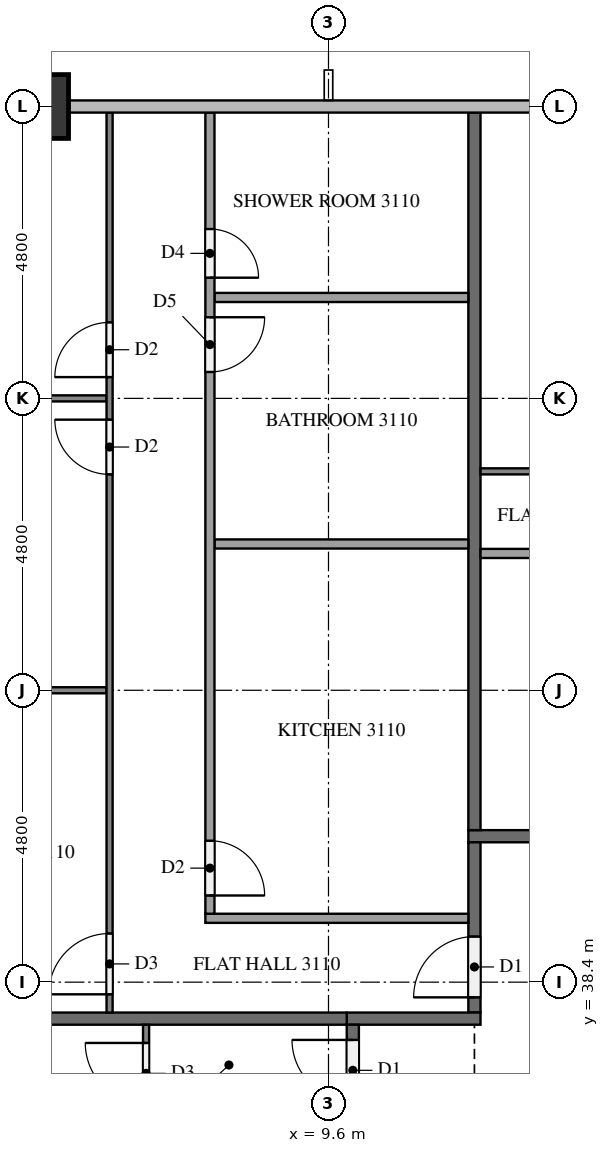
"""IFC4 building model, lengths in metres.
Left out: names, types, materials, properties, quantities, classifications, styles, units other than length and angle.
Written with IfcOpenShell. Run it as: python <this file> out.ifc"""

import sys

from ifc_helpers import new_model, si_unit, direction, frame, frame_2d, origin, origin_2d, place, context, subcontext, project, spatial, rectangle, extrude, element, fill, save


model = new_model("IFC4")
c1 = context("Model", 3, precision=1e-05, world=origin(), true_north=direction((0.0, 1.0)))
c2 = subcontext(c1, "Body", "Model", "MODEL_VIEW")
j1 = project(units=[si_unit("LENGTHUNIT", "METRE"), si_unit("PLANEANGLEUNIT", "RADIAN")], contexts=[c1])
p1 = place(None, origin())
s1 = spatial("IfcSite", under=j1, at=p1, CompositionType="ELEMENT")
p2 = place(p1, origin())
s2 = spatial("IfcBuilding", under=s1, at=p2, CompositionType="ELEMENT")
p3 = place(p2, frame((0.0, 0.0, 122.6)))
s3 = spatial("IfcBuildingStorey", under=s2, at=p3, CompositionType="ELEMENT", Elevation=122.6)
p4 = place(p3, frame((4.8, 52.8, 0.0), z_axis=(0.0, 0.0, 1.0), x_axis=(1.0, 0.0, 0.0)))
e1 = element("IfcColumn", 1, at=p4, inside=s3, PredefinedType="COLUMN", context=c2, shape_type="SweptSolid", body=[
    extrude(rectangle(XDim=1.05, YDim=1.05, at=origin_2d()), origin(), (0.0, 0.0, 1.0), 3.2),
])
p5 = place(p3, frame((11.9, 40.8, 0.0), z_axis=(0.0, 0.0, 1.0), x_axis=(1.0, 0.0, 0.0)))
e2 = element("IfcWall", 2, at=p5, inside=s3, PredefinedType="PARTITIONING", context=c2, shape_type="SweptSolid", body=[
    extrude(rectangle(XDim=38.6, YDim=0.2, at=frame_2d((19.3, 0.0))), origin(), (0.0, 0.0, 1.0), 3.2),
])
p6 = place(p5, frame((37.15, 0.0, 0.0)))
e3 = element("IfcOpeningElement", 3, at=p6, cuts=e2, PredefinedType="OPENING", context=c2, shape_type="SweptSolid", body=[
    extrude(rectangle(XDim=1.0, YDim=2.1, at=frame_2d((0.5, 1.05))), frame((0.0, 0.11, 0.0), z_axis=(0.0, -1.0, 0.0), x_axis=(1.0, 0.0, 0.0)), (0.0, 0.0, 1.0), 0.22),
])
p7 = place(p5, frame((27.55, 0.0, 0.0)))
e4 = element("IfcOpeningElement", 4, at=p7, cuts=e2, PredefinedType="OPENING", context=c2, shape_type="SweptSolid", body=[
    extrude(rectangle(XDim=1.0, YDim=2.1, at=frame_2d((0.5, 1.05))), frame((0.0, 0.11, 0.0), z_axis=(0.0, -1.0, 0.0), x_axis=(1.0, 0.0, 0.0)), (0.0, 0.0, 1.0), 0.22),
])
p8 = place(p5, frame((13.15, 0.0, 0.0)))
e5 = element("IfcOpeningElement", 5, at=p8, cuts=e2, PredefinedType="OPENING", context=c2, shape_type="SweptSolid", body=[
    extrude(rectangle(XDim=1.0, YDim=2.1, at=frame_2d((0.5, 1.05))), frame((0.0, 0.11, 0.0), z_axis=(0.0, -1.0, 0.0), x_axis=(1.0, 0.0, 0.0)), (0.0, 0.0, 1.0), 0.22),
])
p9 = place(p3, frame((12.0, 37.9, 0.0), z_axis=(0.0, 0.0, 1.0), x_axis=(0.0, 1.0, 0.0)))
e6 = element("IfcWall", 6, at=p9, inside=s3, PredefinedType="PARTITIONING", context=c2, shape_type="SweptSolid", body=[
    extrude(rectangle(XDim=2.8, YDim=0.2, at=frame_2d((1.4, 0.0))), origin(), (0.0, 0.0, 1.0), 3.2),
])
p10 = place(p9, frame((0.25, 0.0, 0.0)))
e7 = element("IfcOpeningElement", 7, at=p10, cuts=e6, PredefinedType="OPENING", context=c2, shape_type="SweptSolid", body=[
    extrude(rectangle(XDim=1.0, YDim=2.1, at=frame_2d((0.5, 1.05))), frame((0.0, 0.11, 0.0), z_axis=(0.0, -1.0, 0.0), x_axis=(1.0, 0.0, 0.0)), (0.0, 0.0, 1.0), 0.22),
])
p11 = place(p3, frame((12.1, 37.8, 0.0), z_axis=(0.0, 0.0, 1.0), x_axis=(-1.0, 0.0, 0.0)))
e8 = element("IfcWall", 8, at=p11, inside=s3, PredefinedType="PARTITIONING", context=c2, shape_type="SweptSolid", body=[
    extrude(rectangle(XDim=2.2, YDim=0.2, at=frame_2d((1.1, 0.0))), origin(), (0.0, 0.0, 1.0), 3.2),
])
p12 = place(p3, frame((10.0, 15.1, 0.0), z_axis=(0.0, 0.0, 1.0), x_axis=(0.0, 1.0, 0.0)))
e9 = element("IfcWall", 9, at=p12, inside=s3, PredefinedType="PARTITIONING", context=c2, shape_type="SweptSolid", body=[
    extrude(rectangle(XDim=22.6, YDim=0.2, at=frame_2d((11.3, 0.0))), origin(), (0.0, 0.0, 1.0), 3.2),
])
p13 = place(p12, frame((21.35, 0.0, 0.0)))
e10 = element("IfcOpeningElement", 10, at=p13, cuts=e9, PredefinedType="OPENING", context=c2, shape_type="SweptSolid", body=[
    extrude(rectangle(XDim=1.0, YDim=2.1, at=frame_2d((0.5, 1.05))), frame((0.0, 0.11, 0.0), z_axis=(0.0, -1.0, 0.0), x_axis=(1.0, 0.0, 0.0)), (0.0, 0.0, 1.0), 0.22),
])
p14 = place(p12, frame((12.35, 0.0, 0.0)))
e11 = element("IfcOpeningElement", 11, at=p14, cuts=e9, PredefinedType="OPENING", context=c2, shape_type="SweptSolid", body=[
    extrude(rectangle(XDim=1.0, YDim=2.1, at=frame_2d((0.5, 1.05))), frame((0.0, 0.11, 0.0), z_axis=(0.0, -1.0, 0.0), x_axis=(1.0, 0.0, 0.0)), (0.0, 0.0, 1.0), 0.22),
])
p15 = place(p3, frame((12.0, 52.7, 0.0), z_axis=(0.0, 0.0, 1.0), x_axis=(0.0, -1.0, 0.0)))
e12 = element("IfcWall", 12, at=p15, inside=s3, PredefinedType="PARTITIONING", context=c2, shape_type="SweptSolid", body=[
    extrude(rectangle(XDim=11.8, YDim=0.2, at=frame_2d((5.9, 0.0))), origin(), (0.0, 0.0, 1.0), 3.2),
])
p16 = place(p3, frame((0.375, 37.8, 0.0), z_axis=(0.0, 0.0, 1.0), x_axis=(1.0, 0.0, 0.0)))
e13 = element("IfcWall", 13, at=p16, inside=s3, PredefinedType="PARTITIONING", context=c2, shape_type="SweptSolid", body=[
    extrude(rectangle(XDim=9.525, YDim=0.2, at=frame_2d((4.762, 0.0))), origin(), (0.0, 0.0, 1.0), 3.2),
])
p17 = place(p3, frame((12.1, 46.8, 0.0), z_axis=(0.0, 0.0, 1.0), x_axis=(1.0, 0.0, 0.0)))
e14 = element("IfcWall", 14, at=p17, inside=s3, PredefinedType="PARTITIONING", context=c2, shape_type="SweptSolid", body=[
    extrude(rectangle(XDim=14.2, YDim=0.1, at=frame_2d((7.1, 0.0))), origin(), (0.0, 0.0, 1.0), 3.2),
])
p18 = place(p17, frame((12.9, 0.0, 0.0)))
e15 = element("IfcOpeningElement", 15, at=p18, cuts=e14, PredefinedType="OPENING", context=c2, shape_type="SweptSolid", body=[
    extrude(rectangle(XDim=1.0, YDim=2.1, at=frame_2d((0.5, 1.05))), frame((0.0, 0.06, 0.0), z_axis=(0.0, -1.0, 0.0), x_axis=(1.0, 0.0, 0.0)), (0.0, 0.0, 1.0), 0.12),
])
p19 = place(p17, frame((5.05, 0.0, 0.0)))
e16 = element("IfcOpeningElement", 16, at=p19, cuts=e14, PredefinedType="OPENING", context=c2, shape_type="SweptSolid", body=[
    extrude(rectangle(XDim=0.9, YDim=2.1, at=frame_2d((0.45, 1.05))), frame((0.0, 0.06, 0.0), z_axis=(0.0, -1.0, 0.0), x_axis=(1.0, 0.0, 0.0)), (0.0, 0.0, 1.0), 0.12),
])
p20 = place(p17, frame((3.45, 0.0, 0.0)))
e17 = element("IfcOpeningElement", 17, at=p20, cuts=e14, PredefinedType="OPENING", context=c2, shape_type="SweptSolid", body=[
    extrude(rectangle(XDim=0.9, YDim=2.1, at=frame_2d((0.45, 1.05))), frame((0.0, 0.06, 0.0), z_axis=(0.0, -1.0, 0.0), x_axis=(1.0, 0.0, 0.0)), (0.0, 0.0, 1.0), 0.12),
])
p21 = place(p3, frame((24.675, 45.45, 0.0), z_axis=(0.0, 0.0, 1.0), x_axis=(-1.0, 0.0, 0.0)))
e18 = element("IfcWall", 18, at=p21, inside=s3, PredefinedType="PARTITIONING", context=c2, shape_type="SweptSolid", body=[
    extrude(rectangle(XDim=12.575, YDim=0.15, at=frame_2d((6.288, 0.0))), origin(), (0.0, 0.0, 1.0), 3.2),
])
p22 = place(p21, frame((0.3, 0.0, 0.0)))
e19 = element("IfcOpeningElement", 19, at=p22, cuts=e18, PredefinedType="OPENING", context=c2, shape_type="SweptSolid", body=[
    extrude(rectangle(XDim=0.9, YDim=2.1, at=frame_2d((0.45, 1.05))), frame((0.0, 0.085, 0.0), z_axis=(0.0, -1.0, 0.0), x_axis=(1.0, 0.0, 0.0)), (0.0, 0.0, 1.0), 0.17),
])
p23 = place(p21, frame((5.646, 0.0, 0.0)))
e20 = element("IfcOpeningElement", 20, at=p23, cuts=e18, PredefinedType="OPENING", context=c2, shape_type="SweptSolid", body=[
    extrude(rectangle(XDim=0.8, YDim=2.1, at=frame_2d((0.4, 1.05))), frame((0.0, 0.085, 0.0), z_axis=(0.0, -1.0, 0.0), x_axis=(1.0, 0.0, 0.0)), (0.0, 0.0, 1.0), 0.17),
])
p24 = place(p21, frame((7.096, 0.0, 0.0)))
e21 = element("IfcOpeningElement", 21, at=p24, cuts=e18, PredefinedType="OPENING", context=c2, shape_type="SweptSolid", body=[
    extrude(rectangle(XDim=0.9, YDim=2.1, at=frame_2d((0.45, 1.05))), frame((0.0, 0.085, 0.0), z_axis=(0.0, -1.0, 0.0), x_axis=(1.0, 0.0, 0.0)), (0.0, 0.0, 1.0), 0.17),
])
p25 = place(p3, frame((5.95, 43.2, 0.0), z_axis=(0.0, 0.0, 1.0), x_axis=(-1.0, 0.0, 0.0)))
e22 = element("IfcWall", 22, at=p25, inside=s3, PredefinedType="PARTITIONING", context=c2, shape_type="SweptSolid", body=[
    extrude(rectangle(XDim=5.85, YDim=0.1, at=frame_2d((2.925, 0.0))), origin(), (0.0, 0.0, 1.0), 3.2),
])
p26 = place(p3, frame((5.95, 48.0, 0.0), z_axis=(0.0, 0.0, 1.0), x_axis=(-1.0, 0.0, 0.0)))
e23 = element("IfcWall", 23, at=p26, inside=s3, PredefinedType="PARTITIONING", context=c2, shape_type="SweptSolid", body=[
    extrude(rectangle(XDim=5.425, YDim=0.1, at=frame_2d((2.712, 0.0))), origin(), (0.0, 0.0, 1.0), 3.2),
])
p27 = place(p3, frame((6.0, 37.9, 0.0), z_axis=(0.0, 0.0, 1.0), x_axis=(0.0, 1.0, 0.0)))
e24 = element("IfcWall", 24, at=p27, inside=s3, PredefinedType="PARTITIONING", context=c2, shape_type="SweptSolid", body=[
    extrude(rectangle(XDim=14.8, YDim=0.1, at=frame_2d((7.4, 0.0))), origin(), (0.0, 0.0, 1.0), 3.2),
])
p28 = place(p27, frame((0.3, 0.0, 0.0)))
e25 = element("IfcOpeningElement", 25, at=p28, cuts=e24, PredefinedType="OPENING", context=c2, shape_type="SweptSolid", body=[
    extrude(rectangle(XDim=1.0, YDim=2.1, at=frame_2d((0.5, 1.05))), frame((0.0, 0.06, 0.0), z_axis=(0.0, -1.0, 0.0), x_axis=(1.0, 0.0, 0.0)), (0.0, 0.0, 1.0), 0.12),
])
p29 = place(p27, frame((8.85, 0.0, 0.0)))
e26 = element("IfcOpeningElement", 26, at=p29, cuts=e24, PredefinedType="OPENING", context=c2, shape_type="SweptSolid", body=[
    extrude(rectangle(XDim=0.9, YDim=2.1, at=frame_2d((0.45, 1.05))), frame((0.0, 0.06, 0.0), z_axis=(0.0, -1.0, 0.0), x_axis=(1.0, 0.0, 0.0)), (0.0, 0.0, 1.0), 0.12),
])
p30 = place(p27, frame((10.45, 0.0, 0.0)))
e27 = element("IfcOpeningElement", 27, at=p30, cuts=e24, PredefinedType="OPENING", context=c2, shape_type="SweptSolid", body=[
    extrude(rectangle(XDim=0.9, YDim=2.1, at=frame_2d((0.45, 1.05))), frame((0.0, 0.06, 0.0), z_axis=(0.0, -1.0, 0.0), x_axis=(1.0, 0.0, 0.0)), (0.0, 0.0, 1.0), 0.12),
])
for number, where, z_axis, x_axis in (
    (28, (11.9, 45.606, 0.0), (0.0, 0.0, 1.0), (-1.0, 0.0, 0.0)),
    (29, (11.9, 49.66, 0.0), (0.0, 0.0, 1.0), (-1.0, 0.0, 0.0)),
):
    element("IfcWall", number, at=place(p3, frame(where, z_axis=z_axis, x_axis=x_axis)), inside=s3, PredefinedType="PARTITIONING", context=c2, shape_type="SweptSolid", body=[
        extrude(rectangle(XDim=4.175, YDim=0.15, at=frame_2d((2.087, 0.0))), origin(), (0.0, 0.0, 1.0), 3.2),
    ])
p31 = place(p3, frame((11.9, 39.45, 0.0), z_axis=(0.0, 0.0, 1.0), x_axis=(-1.0, 0.0, 0.0)))
e30 = element("IfcWall", 30, at=p31, inside=s3, PredefinedType="PARTITIONING", context=c2, shape_type="SweptSolid", body=[
    extrude(rectangle(XDim=4.325, YDim=0.15, at=frame_2d((2.163, 0.0))), origin(), (0.0, 0.0, 1.0), 3.2),
])
p32 = place(p3, frame((7.65, 52.7, 0.0), z_axis=(0.0, 0.0, 1.0), x_axis=(0.0, -1.0, 0.0)))
e31 = element("IfcWall", 31, at=p32, inside=s3, PredefinedType="PARTITIONING", context=c2, shape_type="SweptSolid", body=[
    extrude(rectangle(XDim=13.175, YDim=0.15, at=frame_2d((6.587, 0.0))), origin(), (0.0, 0.0, 1.0), 3.2),
])
p33 = place(p32, frame((11.975, 0.0, 0.0)))
e32 = element("IfcOpeningElement", 32, at=p33, cuts=e31, PredefinedType="OPENING", context=c2, shape_type="SweptSolid", body=[
    extrude(rectangle(XDim=0.9, YDim=2.1, at=frame_2d((0.45, 1.05))), frame((0.0, 0.085, 0.0), z_axis=(0.0, -1.0, 0.0), x_axis=(1.0, 0.0, 0.0)), (0.0, 0.0, 1.0), 0.17),
])
p34 = place(p32, frame((3.365, 0.0, 0.0)))
e33 = element("IfcOpeningElement", 33, at=p34, cuts=e31, PredefinedType="OPENING", context=c2, shape_type="SweptSolid", body=[
    extrude(rectangle(XDim=0.9, YDim=2.1, at=frame_2d((0.45, 1.05))), frame((0.0, 0.085, 0.0), z_axis=(0.0, -1.0, 0.0), x_axis=(1.0, 0.0, 0.0)), (0.0, 0.0, 1.0), 0.17),
])
p35 = place(p32, frame((1.915, 0.0, 0.0)))
e34 = element("IfcOpeningElement", 34, at=p35, cuts=e31, PredefinedType="OPENING", context=c2, shape_type="SweptSolid", body=[
    extrude(rectangle(XDim=0.8, YDim=2.1, at=frame_2d((0.4, 1.05))), frame((0.0, 0.085, 0.0), z_axis=(0.0, -1.0, 0.0), x_axis=(1.0, 0.0, 0.0)), (0.0, 0.0, 1.0), 0.17),
])
p36 = place(p3, frame((6.6, 28.9, 0.0), z_axis=(0.0, 0.0, 1.0), x_axis=(0.0, 1.0, 0.0)))
e35 = element("IfcWall", 35, at=p36, inside=s3, PredefinedType="PARTITIONING", context=c2, shape_type="SweptSolid", body=[
    extrude(rectangle(XDim=8.8, YDim=0.1, at=frame_2d((4.4, 0.0))), origin(), (0.0, 0.0, 1.0), 3.2),
])
p37 = place(p36, frame((7.5, 0.0, 0.0)))
e36 = element("IfcOpeningElement", 36, at=p37, cuts=e35, PredefinedType="OPENING", context=c2, shape_type="SweptSolid", body=[
    extrude(rectangle(XDim=1.0, YDim=2.1, at=frame_2d((0.5, 1.05))), frame((0.0, 0.06, 0.0), z_axis=(0.0, -1.0, 0.0), x_axis=(1.0, 0.0, 0.0)), (0.0, 0.0, 1.0), 0.12),
])
p38 = place(p36, frame((0.3, 0.0, 0.0)))
e37 = element("IfcOpeningElement", 37, at=p38, cuts=e35, PredefinedType="OPENING", context=c2, shape_type="SweptSolid", body=[
    extrude(rectangle(XDim=0.9, YDim=2.1, at=frame_2d((0.45, 1.05))), frame((0.0, 0.06, 0.0), z_axis=(0.0, -1.0, 0.0), x_axis=(1.0, 0.0, 0.0)), (0.0, 0.0, 1.0), 0.12),
])
p39 = place(p10, origin())
e38 = element("IfcDoor", 38, at=p39, inside=s3, OperationType="SINGLE_SWING_LEFT", PredefinedType="DOOR", context=c2, shape_type="SweptSolid", body=[
    extrude(rectangle(XDim=1.0, YDim=2.1, at=frame_2d((0.5, 1.05))), frame((0.0, 0.025, 0.0), z_axis=(0.0, -1.0, 0.0), x_axis=(1.0, 0.0, 0.0)), (0.0, 0.0, 1.0), 0.05),
])
fill(e7, e38)
p40 = place(p13, origin())
e39 = element("IfcDoor", 39, at=p40, inside=s3, OperationType="SINGLE_SWING_RIGHT", PredefinedType="DOOR", context=c2, shape_type="SweptSolid", body=[
    extrude(rectangle(XDim=1.0, YDim=2.1, at=frame_2d((0.5, 1.05))), frame((0.0, 0.025, 0.0), z_axis=(0.0, -1.0, 0.0), x_axis=(1.0, 0.0, 0.0)), (0.0, 0.0, 1.0), 0.05),
])
fill(e10, e39)
p41 = place(p28, origin())
e40 = element("IfcDoor", 40, at=p41, inside=s3, OperationType="SINGLE_SWING_LEFT", PredefinedType="DOOR", context=c2, shape_type="SweptSolid", body=[
    extrude(rectangle(XDim=1.0, YDim=2.1, at=frame_2d((0.5, 1.05))), frame((0.0, 0.025, 0.0), z_axis=(0.0, -1.0, 0.0), x_axis=(1.0, 0.0, 0.0)), (0.0, 0.0, 1.0), 0.05),
])
fill(e25, e40)
p42 = place(p29, origin())
e41 = element("IfcDoor", 41, at=p42, inside=s3, OperationType="SINGLE_SWING_RIGHT", PredefinedType="DOOR", context=c2, shape_type="SweptSolid", body=[
    extrude(rectangle(XDim=0.9, YDim=2.1, at=frame_2d((0.45, 1.05))), frame((0.0, 0.025, 0.0), z_axis=(0.0, -1.0, 0.0), x_axis=(1.0, 0.0, 0.0)), (0.0, 0.0, 1.0), 0.05),
])
fill(e26, e41)
p43 = place(p30, origin())
e42 = element("IfcDoor", 42, at=p43, inside=s3, OperationType="SINGLE_SWING_LEFT", PredefinedType="DOOR", context=c2, shape_type="SweptSolid", body=[
    extrude(rectangle(XDim=0.9, YDim=2.1, at=frame_2d((0.45, 1.05))), frame((0.0, 0.025, 0.0), z_axis=(0.0, -1.0, 0.0), x_axis=(1.0, 0.0, 0.0)), (0.0, 0.0, 1.0), 0.05),
])
fill(e27, e42)
p44 = place(p33, origin())
e43 = element("IfcDoor", 43, at=p44, inside=s3, OperationType="SINGLE_SWING_RIGHT", PredefinedType="DOOR", context=c2, shape_type="SweptSolid", body=[
    extrude(rectangle(XDim=0.9, YDim=2.1, at=frame_2d((0.45, 1.05))), frame((0.0, 0.025, 0.0), z_axis=(0.0, -1.0, 0.0), x_axis=(1.0, 0.0, 0.0)), (0.0, 0.0, 1.0), 0.05),
])
fill(e32, e43)
p45 = place(p34, origin())
e44 = element("IfcDoor", 44, at=p45, inside=s3, OperationType="SINGLE_SWING_LEFT", PredefinedType="DOOR", context=c2, shape_type="SweptSolid", body=[
    extrude(rectangle(XDim=0.9, YDim=2.1, at=frame_2d((0.45, 1.05))), frame((0.0, 0.025, 0.0), z_axis=(0.0, -1.0, 0.0), x_axis=(1.0, 0.0, 0.0)), (0.0, 0.0, 1.0), 0.05),
])
fill(e33, e44)
p46 = place(p35, origin())
e45 = element("IfcDoor", 45, at=p46, inside=s3, OperationType="SINGLE_SWING_RIGHT", PredefinedType="DOOR", context=c2, shape_type="SweptSolid", body=[
    extrude(rectangle(XDim=0.8, YDim=2.1, at=frame_2d((0.4, 1.05))), frame((0.0, 0.025, 0.0), z_axis=(0.0, -1.0, 0.0), x_axis=(1.0, 0.0, 0.0)), (0.0, 0.0, 1.0), 0.05),
])
fill(e34, e45)
p47 = place(p37, origin())
e46 = element("IfcDoor", 46, at=p47, inside=s3, OperationType="SINGLE_SWING_RIGHT", PredefinedType="DOOR", context=c2, shape_type="SweptSolid", body=[
    extrude(rectangle(XDim=1.0, YDim=2.1, at=frame_2d((0.5, 1.05))), frame((0.0, 0.025, 0.0), z_axis=(0.0, -1.0, 0.0), x_axis=(1.0, 0.0, 0.0)), (0.0, 0.0, 1.0), 0.05),
])
fill(e36, e46)
save(model, sys.argv[1])
